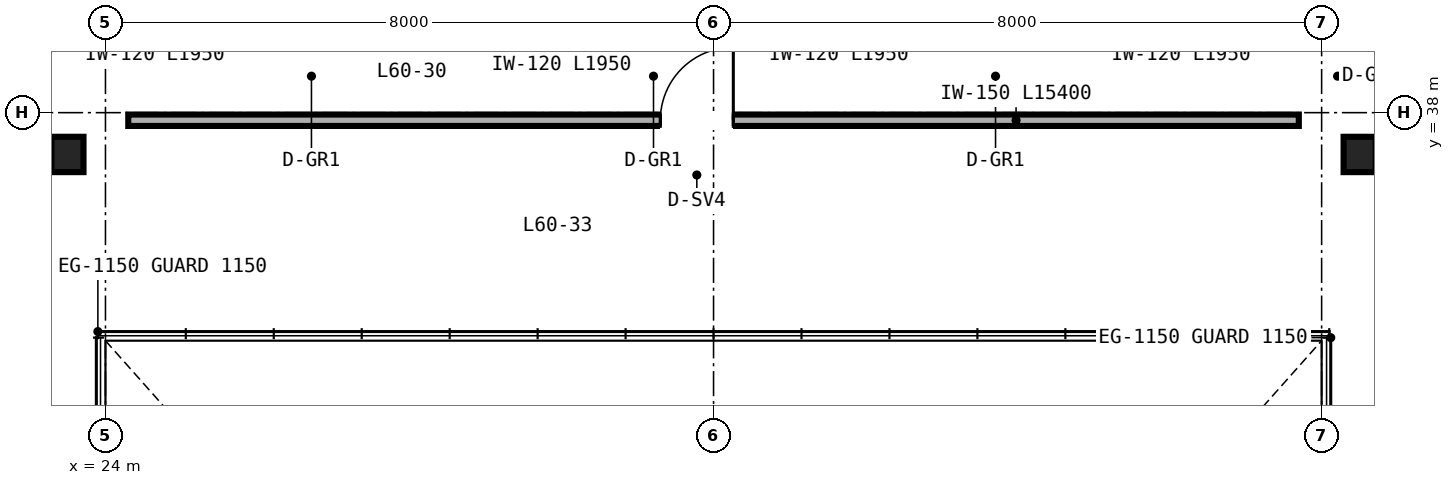
"""IFC4 building model, lengths in metres.
Left out: names, types, materials, properties, quantities, classifications, styles, units other than length and angle.
Written with IfcOpenShell. Run it as: python <this file> out.ifc"""

import sys

from ifc_helpers import new_model, si_unit, direction, frame, frame_2d, origin, origin_2d, place, context, subcontext, project, spatial, rectangle, i_section, extrude, source, transform, mapped, element, fill, save


model = new_model("IFC4")
c1 = context("Model", 3, precision=1e-05, world=origin(), true_north=direction((0.0, 1.0)))
c2 = subcontext(c1, "Body", "Model", "MODEL_VIEW")
j1 = project(units=[si_unit("LENGTHUNIT", "METRE"), si_unit("PLANEANGLEUNIT", "RADIAN")], contexts=[c1])
p1 = place(None, origin())
s1 = spatial("IfcSite", under=j1, at=p1, CompositionType="ELEMENT")
p2 = place(p1, origin())
s2 = spatial("IfcBuilding", under=s1, at=p2, CompositionType="ELEMENT")
p3 = place(p2, frame((0.0, 0.0, 240.0)))
s3 = spatial("IfcBuildingStorey", under=s2, at=p3, CompositionType="ELEMENT", Elevation=240.0)
m1 = source(origin(), c2, "Body", "SweptSolid", [
    extrude(i_section(OverallWidth=0.422, OverallDepth=0.465, WebThickness=0.045, FlangeThickness=0.073, FilletRadius=0.025, at=origin_2d()), origin(), (0.0, 0.0, 1.0), 3.38),
])
for number, where, z_axis, x_axis in (
    (1, (23.5, 37.45, 0.0), (0.0, 0.0, 1.0), (1.0, 0.0, 0.0)),
    (2, (40.5, 37.45, 0.0), (0.0, 0.0, 1.0), (1.0, 0.0, 0.0)),
):
    element("IfcColumn", number, at=place(p3, frame(where, z_axis=z_axis, x_axis=x_axis)), inside=s3, PredefinedType="COLUMN", context=c2, shape_type="MappedRepresentation", body=[
        mapped(m1, transform((0.0, 0.0, 0.0), scale=1.0)),
    ])
p4 = place(p3, frame((24.3, 37.9, 0.0), z_axis=(0.0, 0.0, 1.0), x_axis=(1.0, 0.0, 0.0)))
e3 = element("IfcWall", 3, at=p4, inside=s3, PredefinedType="PARTITIONING", context=c2, shape_type="SweptSolid", body=[
    extrude(rectangle(XDim=15.4, YDim=0.15, at=frame_2d((7.7, 0.0))), origin(), (0.0, 0.0, 1.0), 3.38),
])
p5 = place(p4, frame((7.0, 0.0, 0.0)))
e4 = element("IfcOpeningElement", 4, at=p5, cuts=e3, PredefinedType="OPENING", context=c2, shape_type="SweptSolid", body=[
    extrude(rectangle(XDim=0.96, YDim=2.15, at=frame_2d((0.48, 1.075))), frame((0.0, 0.085, 0.0), z_axis=(0.0, -1.0, 0.0), x_axis=(1.0, 0.0, 0.0)), (0.0, 0.0, 1.0), 0.17),
])
m2 = source(origin(), c2, "Body", "SweptSolid", [
    extrude(rectangle(XDim=0.96, YDim=2.15, at=frame_2d((0.48, 1.075))), frame((0.0, 0.025, 0.0), z_axis=(0.0, -1.0, 0.0), x_axis=(1.0, 0.0, 0.0)), (0.0, 0.0, 1.0), 0.05),
])
p6 = place(p5, origin())
e5 = element("IfcDoor", 5, at=p6, inside=s3, OperationType="SINGLE_SWING_RIGHT", PredefinedType="DOOR", context=c2, shape_type="MappedRepresentation", body=[
    mapped(m2, transform((0.0, 0.0, 0.0), scale=1.0)),
])
fill(e4, e5)
save(model, sys.argv[1])
